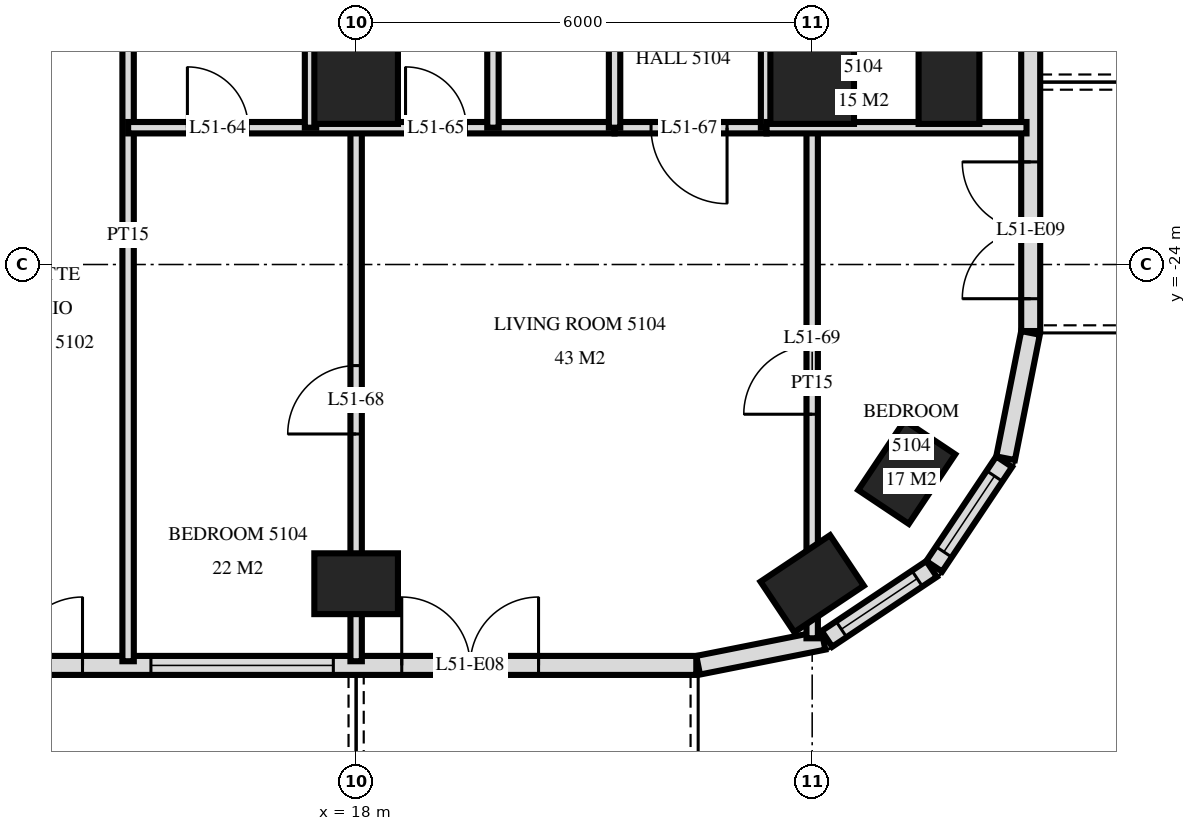
"""IFC4 building model, lengths in metres.
Left out: names, types, materials, properties, quantities, classifications, styles, units other than length and angle.
Written with IfcOpenShell. Run it as: python <this file> out.ifc"""

import sys

from ifc_helpers import new_model, si_unit, direction, frame, frame_2d, origin, origin_2d, place, context, subcontext, project, spatial, rectangle, extrude, element, fill, save


model = new_model("IFC4")
c1 = context("Model", 3, precision=1e-05, world=origin(), true_north=direction((0.0, 1.0)))
c2 = subcontext(c1, "Body", "Model", "MODEL_VIEW")
j1 = project(units=[si_unit("LENGTHUNIT", "METRE"), si_unit("PLANEANGLEUNIT", "RADIAN")], contexts=[c1])
p1 = place(None, origin())
s1 = spatial("IfcSite", under=j1, at=p1, CompositionType="ELEMENT")
p2 = place(p1, origin())
s2 = spatial("IfcBuilding", under=s1, at=p2, CompositionType="ELEMENT")
p3 = place(p2, frame((0.0, 0.0, 197.6)))
s3 = spatial("IfcBuildingStorey", under=s2, at=p3, CompositionType="ELEMENT", Elevation=197.6)
p4 = place(p3, frame((18.0, -28.2, 0.0), z_axis=(0.0, 0.0, 1.0), x_axis=(1.0, 0.0, 0.0)))
e1 = element("IfcColumn", 1, at=p4, inside=s3, PredefinedType="COLUMN", context=c2, shape_type="SweptSolid", body=[
    extrude(rectangle(XDim=1.1, YDim=0.8, at=origin_2d()), origin(), (0.0, 0.0, 1.0), 3.5),
])
p5 = place(p3, frame((18.0, -21.6, 0.0), z_axis=(0.0, 0.0, 1.0), x_axis=(1.0, 0.0, 0.0)))
e2 = element("IfcColumn", 2, at=p5, inside=s3, PredefinedType="COLUMN", context=c2, shape_type="SweptSolid", body=[
    extrude(rectangle(XDim=1.1, YDim=1.1, at=origin_2d()), origin(), (0.0, 0.0, 1.0), 3.5),
])
p6 = place(p3, frame((24.0, -28.2, 0.0), z_axis=(0.0, 0.0, 1.0), x_axis=(0.831459915646, 0.555584744817, 0.0)))
e3 = element("IfcColumn", 3, at=p6, inside=s3, PredefinedType="COLUMN", context=c2, shape_type="SweptSolid", body=[
    extrude(rectangle(XDim=1.1, YDim=0.8, at=origin_2d()), origin(), (0.0, 0.0, 1.0), 3.5),
])
p7 = place(p3, frame((24.0, -21.6, 0.0), z_axis=(0.0, 0.0, 1.0), x_axis=(1.0, 0.0, 0.0)))
e4 = element("IfcColumn", 4, at=p7, inside=s3, PredefinedType="COLUMN", context=c2, shape_type="SweptSolid", body=[
    extrude(rectangle(XDim=1.1, YDim=1.1, at=origin_2d()), origin(), (0.0, 0.0, 1.0), 3.5),
])
for number, where, z_axis, x_axis in (
    (5, (25.244, -26.733, 0.0), (0.0, 0.0, 1.0), (0.556, 0.831, 0.0)),
    (6, (25.8, -21.6, 0.0), (0.0, 0.0, 1.0), (0.0, 1.0, 0.0)),
):
    element("IfcColumn", number, at=place(p3, frame(where, z_axis=z_axis, x_axis=x_axis)), inside=s3, PredefinedType="COLUMN", context=c2, shape_type="SweptSolid", body=[
        extrude(rectangle(XDim=1.1, YDim=0.8, at=origin_2d()), origin(), (0.0, 0.0, 1.0), 3.5),
    ])
p8 = place(p3, frame((-22.475, -29.275, 0.0), z_axis=(0.0, 0.0, 1.0), x_axis=(1.0, 0.0, 0.0)))
e7 = element("IfcWall", 7, at=p8, inside=s3, PredefinedType="SOLIDWALL", context=c2, shape_type="SweptSolid", body=[
    extrude(rectangle(XDim=44.951, YDim=0.25, at=frame_2d((22.475, 0.0))), origin(), (0.0, 0.0, 1.0), 3.22),
])
p9 = place(p8, frame((0.575, 0.0, 0.0)))
e8 = element("IfcOpeningElement", 8, at=p9, cuts=e7, PredefinedType="OPENING", context=c2, shape_type="SweptSolid", body=[
    extrude(rectangle(XDim=1.8, YDim=2.4, at=frame_2d((0.9, 1.2))), frame((0.0, 0.135, 0.0), z_axis=(0.0, -1.0, 0.0), x_axis=(1.0, 0.0, 0.0)), (0.0, 0.0, 1.0), 0.27),
])
p10 = place(p8, frame((4.775, 0.0, 0.9)))
e9 = element("IfcOpeningElement", 9, at=p10, cuts=e7, PredefinedType="OPENING", context=c2, shape_type="SweptSolid", body=[
    extrude(rectangle(XDim=2.4, YDim=1.5, at=frame_2d((1.2, 0.75))), frame((0.0, 0.135, 0.0), z_axis=(0.0, -1.0, 0.0), x_axis=(1.0, 0.0, 0.0)), (0.0, 0.0, 1.0), 0.27),
])
p11 = place(p8, frame((8.075, 0.0, 0.0)))
e10 = element("IfcOpeningElement", 10, at=p11, cuts=e7, PredefinedType="OPENING", context=c2, shape_type="SweptSolid", body=[
    extrude(rectangle(XDim=1.8, YDim=2.4, at=frame_2d((0.9, 1.2))), frame((0.0, 0.135, 0.0), z_axis=(0.0, -1.0, 0.0), x_axis=(1.0, 0.0, 0.0)), (0.0, 0.0, 1.0), 0.27),
])
p12 = place(p8, frame((11.075, 0.0, 0.0)))
e11 = element("IfcOpeningElement", 11, at=p12, cuts=e7, PredefinedType="OPENING", context=c2, shape_type="SweptSolid", body=[
    extrude(rectangle(XDim=1.8, YDim=2.4, at=frame_2d((0.9, 1.2))), frame((0.0, 0.135, 0.0), z_axis=(0.0, -1.0, 0.0), x_axis=(1.0, 0.0, 0.0)), (0.0, 0.0, 1.0), 0.27),
])
p13 = place(p8, frame((13.775, 0.0, 0.9)))
e12 = element("IfcOpeningElement", 12, at=p13, cuts=e7, PredefinedType="OPENING", context=c2, shape_type="SweptSolid", body=[
    extrude(rectangle(XDim=2.4, YDim=1.5, at=frame_2d((1.2, 0.75))), frame((0.0, 0.135, 0.0), z_axis=(0.0, -1.0, 0.0), x_axis=(1.0, 0.0, 0.0)), (0.0, 0.0, 1.0), 0.27),
])
p14 = place(p8, frame((16.775, 0.0, 0.9)))
e13 = element("IfcOpeningElement", 13, at=p14, cuts=e7, PredefinedType="OPENING", context=c2, shape_type="SweptSolid", body=[
    extrude(rectangle(XDim=2.4, YDim=1.5, at=frame_2d((1.2, 0.75))), frame((0.0, 0.135, 0.0), z_axis=(0.0, -1.0, 0.0), x_axis=(1.0, 0.0, 0.0)), (0.0, 0.0, 1.0), 0.27),
])
p15 = place(p8, frame((20.075, 0.0, 0.0)))
e14 = element("IfcOpeningElement", 14, at=p15, cuts=e7, PredefinedType="OPENING", context=c2, shape_type="SweptSolid", body=[
    extrude(rectangle(XDim=1.8, YDim=2.4, at=frame_2d((0.9, 1.2))), frame((0.0, 0.135, 0.0), z_axis=(0.0, -1.0, 0.0), x_axis=(1.0, 0.0, 0.0)), (0.0, 0.0, 1.0), 0.27),
])
p16 = place(p8, frame((23.075, 0.0, 0.0)))
e15 = element("IfcOpeningElement", 15, at=p16, cuts=e7, PredefinedType="OPENING", context=c2, shape_type="SweptSolid", body=[
    extrude(rectangle(XDim=1.8, YDim=2.4, at=frame_2d((0.9, 1.2))), frame((0.0, 0.135, 0.0), z_axis=(0.0, -1.0, 0.0), x_axis=(1.0, 0.0, 0.0)), (0.0, 0.0, 1.0), 0.27),
])
p17 = place(p8, frame((25.775, 0.0, 0.9)))
e16 = element("IfcOpeningElement", 16, at=p17, cuts=e7, PredefinedType="OPENING", context=c2, shape_type="SweptSolid", body=[
    extrude(rectangle(XDim=2.4, YDim=1.5, at=frame_2d((1.2, 0.75))), frame((0.0, 0.135, 0.0), z_axis=(0.0, -1.0, 0.0), x_axis=(1.0, 0.0, 0.0)), (0.0, 0.0, 1.0), 0.27),
])
p18 = place(p8, frame((29.075, 0.0, 0.0)))
e17 = element("IfcOpeningElement", 17, at=p18, cuts=e7, PredefinedType="OPENING", context=c2, shape_type="SweptSolid", body=[
    extrude(rectangle(XDim=1.8, YDim=2.4, at=frame_2d((0.9, 1.2))), frame((0.0, 0.135, 0.0), z_axis=(0.0, -1.0, 0.0), x_axis=(1.0, 0.0, 0.0)), (0.0, 0.0, 1.0), 0.27),
])
p19 = place(p8, frame((31.775, 0.0, 0.9)))
e18 = element("IfcOpeningElement", 18, at=p19, cuts=e7, PredefinedType="OPENING", context=c2, shape_type="SweptSolid", body=[
    extrude(rectangle(XDim=2.4, YDim=1.5, at=frame_2d((1.2, 0.75))), frame((0.0, 0.135, 0.0), z_axis=(0.0, -1.0, 0.0), x_axis=(1.0, 0.0, 0.0)), (0.0, 0.0, 1.0), 0.27),
])
p20 = place(p8, frame((35.075, 0.0, 0.0)))
e19 = element("IfcOpeningElement", 19, at=p20, cuts=e7, PredefinedType="OPENING", context=c2, shape_type="SweptSolid", body=[
    extrude(rectangle(XDim=1.8, YDim=2.4, at=frame_2d((0.9, 1.2))), frame((0.0, 0.135, 0.0), z_axis=(0.0, -1.0, 0.0), x_axis=(1.0, 0.0, 0.0)), (0.0, 0.0, 1.0), 0.27),
])
p21 = place(p8, frame((37.775, 0.0, 0.9)))
e20 = element("IfcOpeningElement", 20, at=p21, cuts=e7, PredefinedType="OPENING", context=c2, shape_type="SweptSolid", body=[
    extrude(rectangle(XDim=2.4, YDim=1.5, at=frame_2d((1.2, 0.75))), frame((0.0, 0.135, 0.0), z_axis=(0.0, -1.0, 0.0), x_axis=(1.0, 0.0, 0.0)), (0.0, 0.0, 1.0), 0.27),
])
p22 = place(p8, frame((41.075, 0.0, 0.0)))
e21 = element("IfcOpeningElement", 21, at=p22, cuts=e7, PredefinedType="OPENING", context=c2, shape_type="SweptSolid", body=[
    extrude(rectangle(XDim=1.8, YDim=2.4, at=frame_2d((0.9, 1.2))), frame((0.0, 0.135, 0.0), z_axis=(0.0, -1.0, 0.0), x_axis=(1.0, 0.0, 0.0)), (0.0, 0.0, 1.0), 0.27),
])
p23 = place(p3, frame((22.5, -29.273, 0.0), z_axis=(0.0, 0.0, 1.0), x_axis=(0.980775640221, 0.19513878023, 0.0)))
e22 = element("IfcWall", 22, at=p23, inside=s3, PredefinedType="SOLIDWALL", context=c2, shape_type="SweptSolid", body=[
    extrude(rectangle(XDim=1.681, YDim=0.25, at=frame_2d((0.841, 0.0))), origin(), (0.0, 0.0, 1.0), 3.22),
])
p24 = place(p3, frame((24.194, -28.926, 0.0), z_axis=(0.0, 0.0, 1.0), x_axis=(0.831482937015, 0.55555029066, 0.0)))
e23 = element("IfcWall", 23, at=p24, inside=s3, PredefinedType="SOLIDWALL", context=c2, shape_type="SweptSolid", body=[
    extrude(rectangle(XDim=1.656, YDim=0.25, at=frame_2d((0.828, 0.0))), origin(), (0.0, 0.0, 1.0), 3.22),
])
p25 = place(p24, frame((0.228, 0.0, 0.9)))
e24 = element("IfcOpeningElement", 24, at=p25, cuts=e23, PredefinedType="OPENING", context=c2, shape_type="SweptSolid", body=[
    extrude(rectangle(XDim=1.2, YDim=1.5, at=frame_2d((0.6, 0.75))), frame((0.0, 0.135, 0.0), z_axis=(0.0, -1.0, 0.0), x_axis=(1.0, 0.0, 0.0)), (0.0, 0.0, 1.0), 0.27),
])
p26 = place(p3, frame((25.606, -27.971, 0.0), z_axis=(0.0, 0.0, 1.0), x_axis=(0.55555029066, 0.831482937015, 0.0)))
e25 = element("IfcWall", 25, at=p26, inside=s3, PredefinedType="SOLIDWALL", context=c2, shape_type="SweptSolid", body=[
    extrude(rectangle(XDim=1.656, YDim=0.25, at=frame_2d((0.828, 0.0))), origin(), (0.0, 0.0, 1.0), 3.22),
])
p27 = place(p26, frame((0.228, 0.0, 0.9)))
e26 = element("IfcOpeningElement", 26, at=p27, cuts=e25, PredefinedType="OPENING", context=c2, shape_type="SweptSolid", body=[
    extrude(rectangle(XDim=1.2, YDim=1.5, at=frame_2d((0.6, 0.75))), frame((0.0, 0.135, 0.0), z_axis=(0.0, -1.0, 0.0), x_axis=(1.0, 0.0, 0.0)), (0.0, 0.0, 1.0), 0.27),
])
p28 = place(p3, frame((26.545, -26.549, 0.0), z_axis=(0.0, 0.0, 1.0), x_axis=(0.195026884138, 0.980797896849, 0.0)))
e27 = element("IfcWall", 27, at=p28, inside=s3, PredefinedType="SOLIDWALL", context=c2, shape_type="SweptSolid", body=[
    extrude(rectangle(XDim=1.681, YDim=0.25, at=frame_2d((0.841, 0.0))), origin(), (0.0, 0.0, 1.0), 3.22),
])
p29 = place(p3, frame((26.875, -24.875, 0.0), z_axis=(0.0, 0.0, 1.0), x_axis=(0.0, 1.0, 0.0)))
e28 = element("IfcWall", 28, at=p29, inside=s3, PredefinedType="SOLIDWALL", context=c2, shape_type="SweptSolid", body=[
    extrude(rectangle(XDim=21.551, YDim=0.25, at=frame_2d((10.775, 0.0))), origin(), (0.0, 0.0, 1.0), 3.22),
])
p30 = place(p29, frame((0.425, 0.0, 0.0)))
e29 = element("IfcOpeningElement", 29, at=p30, cuts=e28, PredefinedType="OPENING", context=c2, shape_type="SweptSolid", body=[
    extrude(rectangle(XDim=1.8, YDim=2.4, at=frame_2d((0.9, 1.2))), frame((0.0, 0.135, 0.0), z_axis=(0.0, -1.0, 0.0), x_axis=(1.0, 0.0, 0.0)), (0.0, 0.0, 1.0), 0.27),
])
p31 = place(p29, frame((3.875, 0.0, 0.0)))
e30 = element("IfcOpeningElement", 30, at=p31, cuts=e28, PredefinedType="OPENING", context=c2, shape_type="SweptSolid", body=[
    extrude(rectangle(XDim=1.8, YDim=2.4, at=frame_2d((0.9, 1.2))), frame((0.0, 0.135, 0.0), z_axis=(0.0, -1.0, 0.0), x_axis=(1.0, 0.0, 0.0)), (0.0, 0.0, 1.0), 0.27),
])
p32 = place(p29, frame((7.775, 0.0, 0.9)))
e31 = element("IfcOpeningElement", 31, at=p32, cuts=e28, PredefinedType="OPENING", context=c2, shape_type="SweptSolid", body=[
    extrude(rectangle(XDim=1.2, YDim=1.5, at=frame_2d((0.6, 0.75))), frame((0.0, 0.135, 0.0), z_axis=(0.0, -1.0, 0.0), x_axis=(1.0, 0.0, 0.0)), (0.0, 0.0, 1.0), 0.27),
])
p33 = place(p29, frame((11.975, 0.0, 0.0)))
e32 = element("IfcOpeningElement", 32, at=p33, cuts=e28, PredefinedType="OPENING", context=c2, shape_type="SweptSolid", body=[
    extrude(rectangle(XDim=1.8, YDim=2.4, at=frame_2d((0.9, 1.2))), frame((0.0, 0.135, 0.0), z_axis=(0.0, -1.0, 0.0), x_axis=(1.0, 0.0, 0.0)), (0.0, 0.0, 1.0), 0.27),
])
p34 = place(p3, frame((24.0, -28.918, 0.0), z_axis=(0.0, 0.0, 1.0), x_axis=(0.0, 1.0, 0.0)))
e33 = element("IfcWall", 33, at=p34, inside=s3, PredefinedType="PARTITIONING", context=c2, shape_type="SweptSolid", body=[
    extrude(rectangle(XDim=6.718, YDim=0.15, at=frame_2d((3.359, 0.0))), origin(), (0.0, 0.0, 1.0), 3.22),
])
p35 = place(p34, frame((2.948, 0.0, 0.0)))
e34 = element("IfcOpeningElement", 34, at=p35, cuts=e33, PredefinedType="OPENING", context=c2, shape_type="SweptSolid", body=[
    extrude(rectangle(XDim=0.9, YDim=2.1, at=frame_2d((0.45, 1.05))), frame((0.0, 0.085, 0.0), z_axis=(0.0, -1.0, 0.0), x_axis=(1.0, 0.0, 0.0)), (0.0, 0.0, 1.0), 0.17),
])
p36 = place(p3, frame((23.4, -22.2, 0.0), z_axis=(0.0, 0.0, 1.0), x_axis=(0.0, 1.0, 0.0)))
e35 = element("IfcWall", 35, at=p36, inside=s3, PredefinedType="PARTITIONING", context=c2, shape_type="SweptSolid", body=[
    extrude(rectangle(XDim=4.2, YDim=0.15, at=frame_2d((2.1, 0.0))), origin(), (0.0, 0.0, 1.0), 3.22),
])
p37 = place(p36, frame((1.62, 0.0, 0.0)))
e36 = element("IfcOpeningElement", 36, at=p37, cuts=e35, PredefinedType="OPENING", context=c2, shape_type="SweptSolid", body=[
    extrude(rectangle(XDim=1.0, YDim=2.1, at=frame_2d((0.5, 1.05))), frame((0.0, 0.085, 0.0), z_axis=(0.0, -1.0, 0.0), x_axis=(1.0, 0.0, 0.0)), (0.0, 0.0, 1.0), 0.17),
])
for number, where, z_axis, x_axis in (
    (37, (21.4, -22.2, 0.0), (0.0, 0.0, 1.0), (0.0, 1.0, 0.0)),
    (38, (19.8, -22.2, 0.0), (0.0, 0.0, 1.0), (0.0, 1.0, 0.0)),
):
    element("IfcWall", number, at=place(p3, frame(where, z_axis=z_axis, x_axis=x_axis)), inside=s3, PredefinedType="PARTITIONING", context=c2, shape_type="SweptSolid", body=[
        extrude(rectangle(XDim=4.2, YDim=0.15, at=frame_2d((2.1, 0.0))), origin(), (0.0, 0.0, 1.0), 3.22),
    ])
p38 = place(p3, frame((18.0, -29.22, 0.0), z_axis=(0.0, 0.0, 1.0), x_axis=(0.0, 1.0, 0.0)))
e39 = element("IfcWall", 39, at=p38, inside=s3, PredefinedType="PARTITIONING", context=c2, shape_type="SweptSolid", body=[
    extrude(rectangle(XDim=7.02, YDim=0.15, at=frame_2d((3.51, 0.0))), origin(), (0.0, 0.0, 1.0), 3.22),
])
p39 = place(p38, frame((2.99, 0.0, 0.0)))
e40 = element("IfcOpeningElement", 40, at=p39, cuts=e39, PredefinedType="OPENING", context=c2, shape_type="SweptSolid", body=[
    extrude(rectangle(XDim=0.9, YDim=2.1, at=frame_2d((0.45, 1.05))), frame((0.0, 0.085, 0.0), z_axis=(0.0, -1.0, 0.0), x_axis=(1.0, 0.0, 0.0)), (0.0, 0.0, 1.0), 0.17),
])
p40 = place(p3, frame((17.4, -22.2, 0.0), z_axis=(0.0, 0.0, 1.0), x_axis=(0.0, 1.0, 0.0)))
e41 = element("IfcWall", 41, at=p40, inside=s3, PredefinedType="PARTITIONING", context=c2, shape_type="SweptSolid", body=[
    extrude(rectangle(XDim=4.2, YDim=0.15, at=frame_2d((2.1, 0.0))), origin(), (0.0, 0.0, 1.0), 3.22),
])
p41 = place(p3, frame((15.0, -29.22, 0.0), z_axis=(0.0, 0.0, 1.0), x_axis=(0.0, 1.0, 0.0)))
e42 = element("IfcWall", 42, at=p41, inside=s3, PredefinedType="PARTITIONING", context=c2, shape_type="SweptSolid", body=[
    extrude(rectangle(XDim=11.22, YDim=0.15, at=frame_2d((5.61, 0.0))), origin(), (0.0, 0.0, 1.0), 3.22),
])
p42 = place(p3, frame((21.4, -22.2, 0.0), z_axis=(0.0, 0.0, 1.0), x_axis=(1.0, 0.0, 0.0)))
e43 = element("IfcWall", 43, at=p42, inside=s3, PredefinedType="PARTITIONING", context=c2, shape_type="SweptSolid", body=[
    extrude(rectangle(XDim=2.0, YDim=0.15, at=frame_2d((1.0, 0.0))), origin(), (0.0, 0.0, 1.0), 3.22),
])
p43 = place(p42, frame((0.48, 0.0, 0.0)))
e44 = element("IfcOpeningElement", 44, at=p43, cuts=e43, PredefinedType="OPENING", context=c2, shape_type="SweptSolid", body=[
    extrude(rectangle(XDim=1.0, YDim=2.1, at=frame_2d((0.5, 1.05))), frame((0.0, 0.085, 0.0), z_axis=(0.0, -1.0, 0.0), x_axis=(1.0, 0.0, 0.0)), (0.0, 0.0, 1.0), 0.17),
])
p44 = place(p3, frame((15.0, -22.2, 0.0), z_axis=(0.0, 0.0, 1.0), x_axis=(1.0, 0.0, 0.0)))
e45 = element("IfcWall", 45, at=p44, inside=s3, PredefinedType="PARTITIONING", context=c2, shape_type="SweptSolid", body=[
    extrude(rectangle(XDim=6.4, YDim=0.15, at=frame_2d((3.2, 0.0))), origin(), (0.0, 0.0, 1.0), 3.22),
])
p45 = place(p44, frame((0.78, 0.0, 0.0)))
e46 = element("IfcOpeningElement", 46, at=p45, cuts=e45, PredefinedType="OPENING", context=c2, shape_type="SweptSolid", body=[
    extrude(rectangle(XDim=0.8, YDim=2.1, at=frame_2d((0.4, 1.05))), frame((0.0, 0.085, 0.0), z_axis=(0.0, -1.0, 0.0), x_axis=(1.0, 0.0, 0.0)), (0.0, 0.0, 1.0), 0.17),
])
p46 = place(p44, frame((3.65, 0.0, 0.0)))
e47 = element("IfcOpeningElement", 47, at=p46, cuts=e45, PredefinedType="OPENING", context=c2, shape_type="SweptSolid", body=[
    extrude(rectangle(XDim=0.8, YDim=2.1, at=frame_2d((0.4, 1.05))), frame((0.0, 0.085, 0.0), z_axis=(0.0, -1.0, 0.0), x_axis=(1.0, 0.0, 0.0)), (0.0, 0.0, 1.0), 0.17),
])
p47 = place(p3, frame((23.4, -22.2, 0.0), z_axis=(0.0, 0.0, 1.0), x_axis=(1.0, 0.0, 0.0)))
e48 = element("IfcWall", 48, at=p47, inside=s3, PredefinedType="PARTITIONING", context=c2, shape_type="SweptSolid", body=[
    extrude(rectangle(XDim=3.42, YDim=0.15, at=frame_2d((1.71, 0.0))), origin(), (0.0, 0.0, 1.0), 3.22),
])
p48 = place(p25, origin())
e49 = element("IfcWindow", 49, at=p48, inside=s3, PartitioningType="SINGLE_PANEL", PredefinedType="WINDOW", context=c2, shape_type="SweptSolid", body=[
    extrude(rectangle(XDim=1.2, YDim=1.5, at=frame_2d((0.6, 0.75))), frame((0.0, 0.03, 0.0), z_axis=(0.0, -1.0, 0.0), x_axis=(1.0, 0.0, 0.0)), (0.0, 0.0, 1.0), 0.06),
])
fill(e24, e49)
p49 = place(p27, origin())
e50 = element("IfcWindow", 50, at=p49, inside=s3, PartitioningType="SINGLE_PANEL", PredefinedType="WINDOW", context=c2, shape_type="SweptSolid", body=[
    extrude(rectangle(XDim=1.2, YDim=1.5, at=frame_2d((0.6, 0.75))), frame((0.0, 0.03, 0.0), z_axis=(0.0, -1.0, 0.0), x_axis=(1.0, 0.0, 0.0)), (0.0, 0.0, 1.0), 0.06),
])
fill(e26, e50)
p50 = place(p20, origin())
e51 = element("IfcDoor", 51, at=p50, inside=s3, OperationType="DOUBLE_DOOR_SINGLE_SWING", PredefinedType="DOOR", context=c2, shape_type="SweptSolid", body=[
    extrude(rectangle(XDim=1.8, YDim=2.4, at=frame_2d((0.9, 1.2))), frame((0.0, 0.025, 0.0), z_axis=(0.0, -1.0, 0.0), x_axis=(1.0, 0.0, 0.0)), (0.0, 0.0, 1.0), 0.05),
])
fill(e19, e51)
p51 = place(p21, origin())
e52 = element("IfcWindow", 52, at=p51, inside=s3, PartitioningType="SINGLE_PANEL", PredefinedType="WINDOW", context=c2, shape_type="SweptSolid", body=[
    extrude(rectangle(XDim=2.4, YDim=1.5, at=frame_2d((1.2, 0.75))), frame((0.0, 0.03, 0.0), z_axis=(0.0, -1.0, 0.0), x_axis=(1.0, 0.0, 0.0)), (0.0, 0.0, 1.0), 0.06),
])
fill(e20, e52)
p52 = place(p22, origin())
e53 = element("IfcDoor", 53, at=p52, inside=s3, OperationType="DOUBLE_DOOR_SINGLE_SWING", PredefinedType="DOOR", context=c2, shape_type="SweptSolid", body=[
    extrude(rectangle(XDim=1.8, YDim=2.4, at=frame_2d((0.9, 1.2))), frame((0.0, 0.025, 0.0), z_axis=(0.0, -1.0, 0.0), x_axis=(1.0, 0.0, 0.0)), (0.0, 0.0, 1.0), 0.05),
])
fill(e21, e53)
p53 = place(p30, origin())
e54 = element("IfcDoor", 54, at=p53, inside=s3, OperationType="DOUBLE_DOOR_SINGLE_SWING", PredefinedType="DOOR", context=c2, shape_type="SweptSolid", body=[
    extrude(rectangle(XDim=1.8, YDim=2.4, at=frame_2d((0.9, 1.2))), frame((0.0, 0.025, 0.0), z_axis=(0.0, -1.0, 0.0), x_axis=(1.0, 0.0, 0.0)), (0.0, 0.0, 1.0), 0.05),
])
fill(e29, e54)
p54 = place(p45, origin())
e55 = element("IfcDoor", 55, at=p54, inside=s3, OperationType="SINGLE_SWING_RIGHT", PredefinedType="DOOR", context=c2, shape_type="SweptSolid", body=[
    extrude(rectangle(XDim=0.8, YDim=2.1, at=frame_2d((0.4, 1.05))), frame((0.0, 0.025, 0.0), z_axis=(0.0, -1.0, 0.0), x_axis=(1.0, 0.0, 0.0)), (0.0, 0.0, 1.0), 0.05),
])
fill(e46, e55)
p55 = place(p46, origin())
e56 = element("IfcDoor", 56, at=p55, inside=s3, OperationType="SINGLE_SWING_RIGHT", PredefinedType="DOOR", context=c2, shape_type="SweptSolid", body=[
    extrude(rectangle(XDim=0.8, YDim=2.1, at=frame_2d((0.4, 1.05))), frame((0.0, 0.025, 0.0), z_axis=(0.0, -1.0, 0.0), x_axis=(1.0, 0.0, 0.0)), (0.0, 0.0, 1.0), 0.05),
])
fill(e47, e56)
p56 = place(p43, frame((0.5, 0.0, 0.0), z_axis=(0.0, 0.0, 1.0), x_axis=(-1.0, 0.0, 0.0)))
e57 = element("IfcDoor", 57, at=p56, inside=s3, OperationType="SINGLE_SWING_RIGHT", PredefinedType="DOOR", context=c2, shape_type="SweptSolid", body=[
    extrude(rectangle(XDim=1.0, YDim=2.1, at=frame_2d((0.0, 1.05))), frame((0.0, -0.025, 0.0), z_axis=(0.0, 1.0, 0.0), x_axis=(-1.0, 0.0, 0.0)), (0.0, 0.0, 1.0), 0.05),
])
fill(e44, e57)
p57 = place(p39, origin())
e58 = element("IfcDoor", 58, at=p57, inside=s3, OperationType="SINGLE_SWING_RIGHT", PredefinedType="DOOR", context=c2, shape_type="SweptSolid", body=[
    extrude(rectangle(XDim=0.9, YDim=2.1, at=frame_2d((0.45, 1.05))), frame((0.0, 0.025, 0.0), z_axis=(0.0, -1.0, 0.0), x_axis=(1.0, 0.0, 0.0)), (0.0, 0.0, 1.0), 0.05),
])
fill(e40, e58)
p58 = place(p35, origin())
e59 = element("IfcDoor", 59, at=p58, inside=s3, OperationType="SINGLE_SWING_RIGHT", PredefinedType="DOOR", context=c2, shape_type="SweptSolid", body=[
    extrude(rectangle(XDim=0.9, YDim=2.1, at=frame_2d((0.45, 1.05))), frame((0.0, 0.025, 0.0), z_axis=(0.0, -1.0, 0.0), x_axis=(1.0, 0.0, 0.0)), (0.0, 0.0, 1.0), 0.05),
])
fill(e34, e59)
save(model, sys.argv[1])
